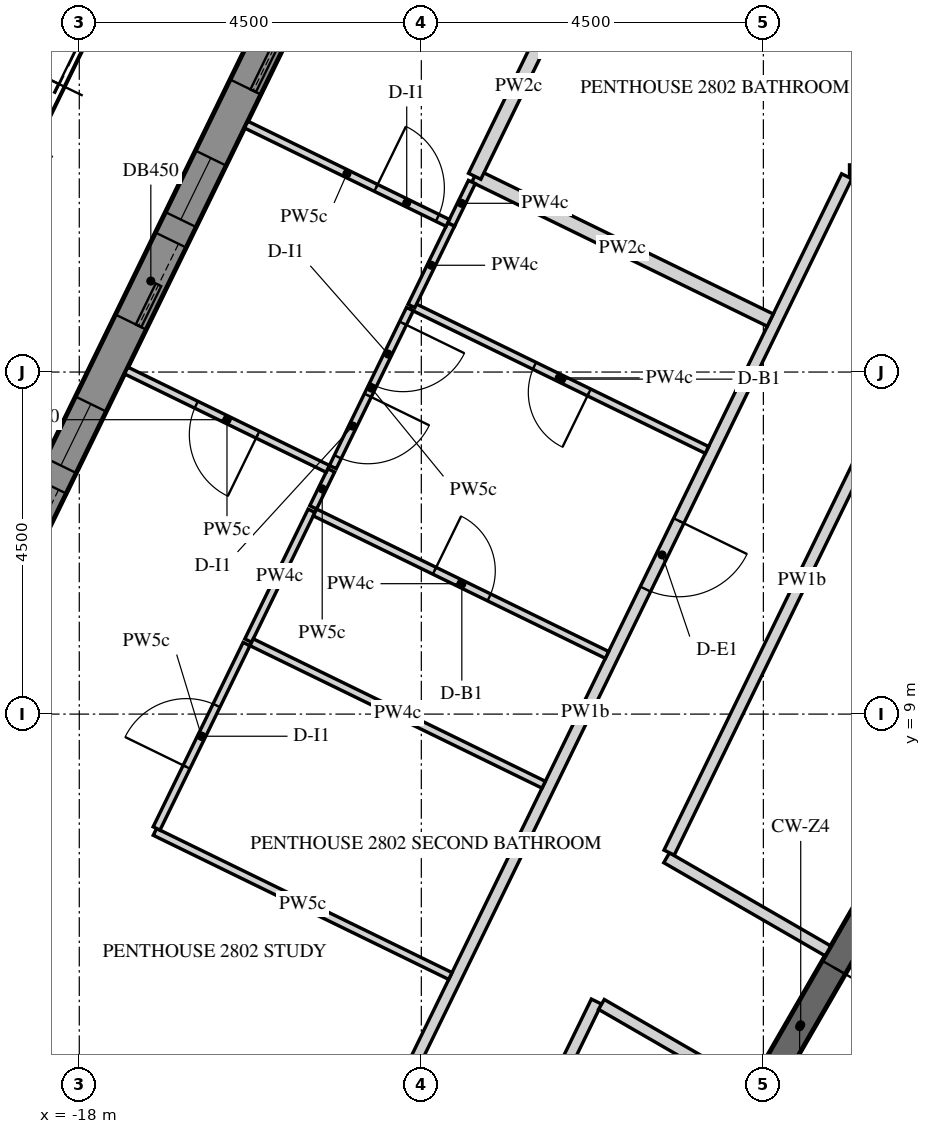
"""IFC4 building model, lengths in metres.
Left out: names, types, materials, properties, quantities, classifications, styles, units other than length and angle.
Written with IfcOpenShell. Run it as: python <this file> out.ifc"""

import sys

from ifc_helpers import new_model, si_unit, direction, frame, frame_2d, origin, place, context, subcontext, project, spatial, polyline, rectangle, outline, extrude, element, fill, save


model = new_model("IFC4")
c1 = context("Model", 3, precision=1e-05, world=origin(), true_north=direction((0.0, 1.0)))
c2 = subcontext(c1, "Body", "Model", "MODEL_VIEW")
j1 = project(units=[si_unit("LENGTHUNIT", "METRE"), si_unit("PLANEANGLEUNIT", "RADIAN")], contexts=[c1])
p1 = place(None, origin())
s1 = spatial("IfcSite", under=j1, at=p1, CompositionType="ELEMENT")
p2 = place(p1, origin())
s2 = spatial("IfcBuilding", under=s1, at=p2, CompositionType="ELEMENT")
p3 = place(p2, frame((0.0, 0.0, 361.2)))
s3 = spatial("IfcBuildingStorey", under=s2, at=p3, CompositionType="ELEMENT", Elevation=361.2)
p4 = place(p3, frame((-14.619, 19.699, -0.15), z_axis=(0.0, 0.0, 1.0), x_axis=(-0.438373747484, -0.898792777851, 0.0)))
e1 = element("IfcWall", 1, at=p4, inside=s3, PredefinedType="SOLIDWALL", context=c2, shape_type="SweptSolid", body=[
    extrude(outline(polyline([(0.225, -0.225), (20.506, -0.225), (20.957, 0.225), (-0.225, 0.225), (0.225, -0.225)])), origin(), (0.0, 0.0, 1.0), 3.9),
])
p5 = place(p4, frame((0.325, 0.0, 1.05)))
e2 = element("IfcOpeningElement", 2, at=p5, cuts=e1, PredefinedType="OPENING", context=c2, shape_type="SweptSolid", body=[
    extrude(rectangle(XDim=0.9, YDim=1.5, at=frame_2d((0.45, 0.75))), frame((0.0, 0.235, 0.0), z_axis=(0.0, -1.0, 0.0), x_axis=(1.0, 0.0, 0.0)), (0.0, 0.0, 1.0), 0.47),
])
p6 = place(p4, frame((1.525, 0.0, 0.15)))
e3 = element("IfcOpeningElement", 3, at=p6, cuts=e1, PredefinedType="OPENING", context=c2, shape_type="SweptSolid", body=[
    extrude(rectangle(XDim=1.2, YDim=2.4, at=frame_2d((0.6, 1.2))), frame((0.0, 0.235, 0.0), z_axis=(0.0, -1.0, 0.0), x_axis=(1.0, 0.0, 0.0)), (0.0, 0.0, 1.0), 0.47),
])
p7 = place(p4, frame((3.766, 0.0, 1.05)))
e4 = element("IfcOpeningElement", 4, at=p7, cuts=e1, PredefinedType="OPENING", context=c2, shape_type="SweptSolid", body=[
    extrude(rectangle(XDim=0.9, YDim=1.5, at=frame_2d((0.45, 0.75))), frame((0.0, 0.235, 0.0), z_axis=(0.0, -1.0, 0.0), x_axis=(1.0, 0.0, 0.0)), (0.0, 0.0, 1.0), 0.47),
])
p8 = place(p4, frame((4.966, 0.0, 0.15)))
e5 = element("IfcOpeningElement", 5, at=p8, cuts=e1, PredefinedType="OPENING", context=c2, shape_type="SweptSolid", body=[
    extrude(rectangle(XDim=1.2, YDim=2.4, at=frame_2d((0.6, 1.2))), frame((0.0, 0.235, 0.0), z_axis=(0.0, -1.0, 0.0), x_axis=(1.0, 0.0, 0.0)), (0.0, 0.0, 1.0), 0.47),
])
p9 = place(p4, frame((7.366, 0.0, 1.05)))
e6 = element("IfcOpeningElement", 6, at=p9, cuts=e1, PredefinedType="OPENING", context=c2, shape_type="SweptSolid", body=[
    extrude(rectangle(XDim=0.9, YDim=1.5, at=frame_2d((0.45, 0.75))), frame((0.0, 0.235, 0.0), z_axis=(0.0, -1.0, 0.0), x_axis=(1.0, 0.0, 0.0)), (0.0, 0.0, 1.0), 0.47),
])
p10 = place(p4, frame((8.566, 0.0, 0.15)))
e7 = element("IfcOpeningElement", 7, at=p10, cuts=e1, PredefinedType="OPENING", context=c2, shape_type="SweptSolid", body=[
    extrude(rectangle(XDim=1.2, YDim=2.4, at=frame_2d((0.6, 1.2))), frame((0.0, 0.235, 0.0), z_axis=(0.0, -1.0, 0.0), x_axis=(1.0, 0.0, 0.0)), (0.0, 0.0, 1.0), 0.47),
])
p11 = place(p4, frame((10.966, 0.0, 1.05)))
e8 = element("IfcOpeningElement", 8, at=p11, cuts=e1, PredefinedType="OPENING", context=c2, shape_type="SweptSolid", body=[
    extrude(rectangle(XDim=0.9, YDim=1.5, at=frame_2d((0.45, 0.75))), frame((0.0, 0.235, 0.0), z_axis=(0.0, -1.0, 0.0), x_axis=(1.0, 0.0, 0.0)), (0.0, 0.0, 1.0), 0.47),
])
p12 = place(p4, frame((12.166, 0.0, 0.15)))
e9 = element("IfcOpeningElement", 9, at=p12, cuts=e1, PredefinedType="OPENING", context=c2, shape_type="SweptSolid", body=[
    extrude(rectangle(XDim=1.2, YDim=2.4, at=frame_2d((0.6, 1.2))), frame((0.0, 0.235, 0.0), z_axis=(0.0, -1.0, 0.0), x_axis=(1.0, 0.0, 0.0)), (0.0, 0.0, 1.0), 0.47),
])
p13 = place(p4, frame((14.566, 0.0, 1.05)))
e10 = element("IfcOpeningElement", 10, at=p13, cuts=e1, PredefinedType="OPENING", context=c2, shape_type="SweptSolid", body=[
    extrude(rectangle(XDim=0.9, YDim=1.5, at=frame_2d((0.45, 0.75))), frame((0.0, 0.235, 0.0), z_axis=(0.0, -1.0, 0.0), x_axis=(1.0, 0.0, 0.0)), (0.0, 0.0, 1.0), 0.47),
])
p14 = place(p4, frame((15.766, 0.0, 0.15)))
e11 = element("IfcOpeningElement", 11, at=p14, cuts=e1, PredefinedType="OPENING", context=c2, shape_type="SweptSolid", body=[
    extrude(rectangle(XDim=1.2, YDim=2.4, at=frame_2d((0.6, 1.2))), frame((0.0, 0.235, 0.0), z_axis=(0.0, -1.0, 0.0), x_axis=(1.0, 0.0, 0.0)), (0.0, 0.0, 1.0), 0.47),
])
p15 = place(p4, frame((18.007, 0.0, 1.05)))
e12 = element("IfcOpeningElement", 12, at=p15, cuts=e1, PredefinedType="OPENING", context=c2, shape_type="SweptSolid", body=[
    extrude(rectangle(XDim=0.9, YDim=1.5, at=frame_2d((0.45, 0.75))), frame((0.0, 0.235, 0.0), z_axis=(0.0, -1.0, 0.0), x_axis=(1.0, 0.0, 0.0)), (0.0, 0.0, 1.0), 0.47),
])
p16 = place(p4, frame((19.207, 0.0, 0.15)))
e13 = element("IfcOpeningElement", 13, at=p16, cuts=e1, PredefinedType="OPENING", context=c2, shape_type="SweptSolid", body=[
    extrude(rectangle(XDim=1.2, YDim=2.4, at=frame_2d((0.6, 1.2))), frame((0.0, 0.235, 0.0), z_axis=(0.0, -1.0, 0.0), x_axis=(1.0, 0.0, 0.0)), (0.0, 0.0, 1.0), 0.47),
])
p17 = place(p3, frame((-5.673, 9.825, -0.15), z_axis=(0.0, 0.0, 1.0), x_axis=(-0.499995046907, -0.866028263435, 0.0)))
e14 = element("IfcWall", 14, at=p17, inside=s3, PredefinedType="SHEAR", context=c2, shape_type="SweptSolid", body=[
    extrude(outline(polyline([(-0.101, -0.175), (11.446, -0.175), (11.244, 0.175), (0.101, 0.175), (-0.101, -0.175)])), origin(), (0.0, 0.0, 1.0), 3.9),
])
p18 = place(p17, frame((4.801, 0.0, 0.15)))
e15 = element("IfcOpeningElement", 15, at=p18, cuts=e14, PredefinedType="OPENING", context=c2, shape_type="SweptSolid", body=[
    extrude(rectangle(XDim=1.8, YDim=2.4, at=frame_2d((0.9, 1.2))), frame((0.0, 0.185, 0.0), z_axis=(0.0, -1.0, 0.0), x_axis=(1.0, 0.0, 0.0)), (0.0, 0.0, 1.0), 0.37),
])
p19 = place(p3, frame((6.1, 16.15, 0.0), z_axis=(0.0, 0.0, 1.0), x_axis=(-1.0, 0.0, 0.0)))
e16 = element("IfcWall", 16, at=p19, inside=s3, PredefinedType="PARTITIONING", context=c2, shape_type="SweptSolid", body=[
    extrude(rectangle(XDim=13.966, YDim=0.15, at=frame_2d((6.983, 0.0))), origin(), (0.0, 0.0, 1.0), 2.82),
])
p20 = place(p19, frame((3.325, 0.0, 0.0)))
e17 = element("IfcOpeningElement", 17, at=p20, cuts=e16, PredefinedType="OPENING", context=c2, shape_type="SweptSolid", body=[
    extrude(rectangle(XDim=1.0, YDim=2.1, at=frame_2d((0.5, 1.05))), frame((0.0, 0.085, 0.0), z_axis=(0.0, -1.0, 0.0), x_axis=(1.0, 0.0, 0.0)), (0.0, 0.0, 1.0), 0.17),
])
p21 = place(p3, frame((-7.903, 16.075, 0.0), z_axis=(0.0, 0.0, 1.0), x_axis=(-0.438364761272, -0.898797160696, 0.0)))
e18 = element("IfcWall", 18, at=p21, inside=s3, PredefinedType="PARTITIONING", context=c2, shape_type="SweptSolid", body=[
    extrude(rectangle(XDim=15.688, YDim=0.15, at=frame_2d((7.844, 0.0))), origin(), (0.0, 0.0, 1.0), 2.82),
])
p22 = place(p21, frame((5.042, 0.0, 0.0)))
e19 = element("IfcOpeningElement", 19, at=p22, cuts=e18, PredefinedType="OPENING", context=c2, shape_type="SweptSolid", body=[
    extrude(rectangle(XDim=1.0, YDim=2.1, at=frame_2d((0.5, 1.05))), frame((0.0, 0.085, 0.0), z_axis=(0.0, -1.0, 0.0), x_axis=(1.0, 0.0, 0.0)), (0.0, 0.0, 1.0), 0.17),
])
p23 = place(p3, frame((-13.466, 0.564, 0.0), z_axis=(0.0, 0.0, 1.0), x_axis=(0.438366040624, 0.898796536724, 0.0)))
e20 = element("IfcWall", 20, at=p23, inside=s3, PredefinedType="PARTITIONING", context=c2, shape_type="SweptSolid", body=[
    extrude(rectangle(XDim=5.178, YDim=0.15, at=frame_2d((2.589, 0.0))), origin(), (0.0, 0.0, 1.0), 2.82),
])
p24 = place(p3, frame((-11.131, 5.18, 0.0), z_axis=(0.0, 0.0, 1.0), x_axis=(0.866037886895, -0.499978377995, 0.0)))
e21 = element("IfcWall", 21, at=p24, inside=s3, PredefinedType="PARTITIONING", context=c2, shape_type="SweptSolid", body=[
    extrude(rectangle(XDim=2.229, YDim=0.15, at=frame_2d((1.115, 0.0))), origin(), (0.0, 0.0, 1.0), 2.82),
])
p25 = place(p3, frame((-8.15, 5.884, 0.0), z_axis=(0.0, 0.0, 1.0), x_axis=(-0.866009790468, 0.500027042082, 0.0)))
e22 = element("IfcWall", 22, at=p25, inside=s3, PredefinedType="PARTITIONING", context=c2, shape_type="SweptSolid", body=[
    extrude(rectangle(XDim=2.451, YDim=0.15, at=frame_2d((1.226, 0.0))), origin(), (0.0, 0.0, 1.0), 2.82),
])
p26 = place(p3, frame((-10.24, 7.178, 0.0), z_axis=(0.0, 0.0, 1.0), x_axis=(0.438356120288, 0.898801375058, 0.0)))
e23 = element("IfcWall", 23, at=p26, inside=s3, PredefinedType="PARTITIONING", context=c2, shape_type="SweptSolid", body=[
    extrude(rectangle(XDim=7.98, YDim=0.15, at=frame_2d((3.99, 0.0))), origin(), (0.0, 0.0, 1.0), 2.82),
])
p27 = place(p3, frame((-12.797, 16.079, 0.0), z_axis=(0.0, 0.0, 1.0), x_axis=(0.898786890582, -0.438385817879, 0.0)))
e24 = element("IfcWall", 24, at=p27, inside=s3, PredefinedType="PARTITIONING", context=c2, shape_type="SweptSolid", body=[
    extrude(rectangle(XDim=4.325, YDim=0.18, at=frame_2d((2.163, 0.0))), origin(), (0.0, 0.0, 1.0), 2.82),
])
p28 = place(p3, frame((-11.638, 18.455, 0.0), z_axis=(0.0, 0.0, 1.0), x_axis=(-0.438336396292, -0.898810994417, 0.0)))
e25 = element("IfcWall", 25, at=p28, inside=s3, PredefinedType="PARTITIONING", context=c2, shape_type="SweptSolid", body=[
    extrude(rectangle(XDim=2.647, YDim=0.18, at=frame_2d((1.323, 0.0))), origin(), (0.0, 0.0, 1.0), 2.82),
])
p29 = place(p3, frame((-14.923, 11.72, 0.0), z_axis=(0.0, 0.0, 1.0), x_axis=(0.438174929392, 0.898889721408, 0.0)))
e26 = element("IfcWall", 26, at=p29, inside=s3, PredefinedType="PARTITIONING", context=c2, shape_type="SweptSolid", body=[
    extrude(rectangle(XDim=0.542, YDim=0.1, at=frame_2d((0.271, 0.0))), origin(), (0.0, 0.0, 1.0), 2.82),
])
p30 = place(p3, frame((-14.731, 12.227, 0.0), z_axis=(0.0, 0.0, 1.0), x_axis=(-0.898802642499, 0.438353521528, 0.0)))
e27 = element("IfcWall", 27, at=p30, inside=s3, PredefinedType="PARTITIONING", context=c2, shape_type="SweptSolid", body=[
    extrude(rectangle(XDim=2.95, YDim=0.1, at=frame_2d((1.475, 0.0))), origin(), (0.0, 0.0, 1.0), 2.82),
])
p31 = place(p30, frame((1.025, 0.0, 0.0)))
e28 = element("IfcOpeningElement", 28, at=p31, cuts=e27, PredefinedType="OPENING", context=c2, shape_type="SweptSolid", body=[
    extrude(rectangle(XDim=0.9, YDim=2.1, at=frame_2d((0.45, 1.05))), frame((0.0, 0.06, 0.0), z_axis=(0.0, -1.0, 0.0), x_axis=(1.0, 0.0, 0.0)), (0.0, 0.0, 1.0), 0.12),
])
p32 = place(p3, frame((-15.778, 9.967, 0.0), z_axis=(0.0, 0.0, 1.0), x_axis=(0.43840337997, 0.898778324411, 0.0)))
e29 = element("IfcWall", 29, at=p32, inside=s3, PredefinedType="PARTITIONING", context=c2, shape_type="SweptSolid", body=[
    extrude(rectangle(XDim=1.9, YDim=0.1, at=frame_2d((0.95, 0.0))), origin(), (0.0, 0.0, 1.0), 2.82),
])
p33 = place(p3, frame((-13.118, 5.554, 0.0), z_axis=(0.0, 0.0, 1.0), x_axis=(-0.898786890582, 0.438385817879, 0.0)))
e30 = element("IfcWall", 30, at=p33, inside=s3, PredefinedType="PARTITIONING", context=c2, shape_type="SweptSolid", body=[
    extrude(rectangle(XDim=4.325, YDim=0.1, at=frame_2d((2.163, 0.0))), origin(), (0.0, 0.0, 1.0), 2.82),
])
p34 = place(p3, frame((-16.983, 7.495, 0.0), z_axis=(0.0, 0.0, 1.0), x_axis=(0.438366623032, 0.898796252669, 0.0)))
e31 = element("IfcWall", 31, at=p34, inside=s3, PredefinedType="PARTITIONING", context=c2, shape_type="SweptSolid", body=[
    extrude(rectangle(XDim=2.7, YDim=0.1, at=frame_2d((1.35, 0.0))), origin(), (0.0, 0.0, 1.0), 2.82),
])
p35 = place(p34, frame((0.9, 0.0, 0.0)))
e32 = element("IfcOpeningElement", 32, at=p35, cuts=e31, PredefinedType="OPENING", context=c2, shape_type="SweptSolid", body=[
    extrude(rectangle(XDim=0.9, YDim=2.1, at=frame_2d((0.45, 1.05))), frame((0.0, 0.06, 0.0), z_axis=(0.0, -1.0, 0.0), x_axis=(1.0, 0.0, 0.0)), (0.0, 0.0, 1.0), 0.12),
])
p36 = place(p3, frame((-9.742, 12.475, 0.0), z_axis=(0.0, 0.0, 1.0), x_axis=(-0.898786890582, 0.438385817879, 0.0)))
e33 = element("IfcWall", 33, at=p36, inside=s3, PredefinedType="PARTITIONING", context=c2, shape_type="SweptSolid", body=[
    extrude(rectangle(XDim=4.325, YDim=0.1, at=frame_2d((2.163, 0.0))), origin(), (0.0, 0.0, 1.0), 2.82),
])
p37 = place(p36, frame((1.725, 0.0, 0.0)))
e34 = element("IfcOpeningElement", 34, at=p37, cuts=e33, PredefinedType="OPENING", context=c2, shape_type="SweptSolid", body=[
    extrude(rectangle(XDim=0.8, YDim=2.1, at=frame_2d((0.4, 1.05))), frame((0.0, 0.06, 0.0), z_axis=(0.0, -1.0, 0.0), x_axis=(1.0, 0.0, 0.0)), (0.0, 0.0, 1.0), 0.12),
])
p38 = place(p3, frame((-13.651, 14.328, 0.0), z_axis=(0.0, 0.0, 1.0), x_axis=(-0.438406989319, -0.898776563845, 0.0)))
e35 = element("IfcWall", 35, at=p38, inside=s3, PredefinedType="PARTITIONING", context=c2, shape_type="SweptSolid", body=[
    extrude(rectangle(XDim=2.312, YDim=0.1, at=frame_2d((1.156, 0.0))), origin(), (0.0, 0.0, 1.0), 2.82),
])
p39 = place(p38, frame((1.262, 0.0, 0.0)))
e36 = element("IfcOpeningElement", 36, at=p39, cuts=e35, PredefinedType="OPENING", context=c2, shape_type="SweptSolid", body=[
    extrude(rectangle(XDim=0.9, YDim=2.1, at=frame_2d((0.45, 1.05))), frame((0.0, 0.06, 0.0), z_axis=(0.0, -1.0, 0.0), x_axis=(1.0, 0.0, 0.0)), (0.0, 0.0, 1.0), 0.12),
])
p40 = place(p38, frame((0.207, 0.0, 0.0)))
e37 = element("IfcOpeningElement", 37, at=p40, cuts=e35, PredefinedType="OPENING", context=c2, shape_type="SweptSolid", body=[
    extrude(rectangle(XDim=0.9, YDim=2.1, at=frame_2d((0.45, 1.05))), frame((0.0, 0.06, 0.0), z_axis=(0.0, -1.0, 0.0), x_axis=(1.0, 0.0, 0.0)), (0.0, 0.0, 1.0), 0.12),
])
p41 = place(p3, frame((-14.9, 11.653, 0.0), z_axis=(0.0, 0.0, 1.0), x_axis=(0.898792594469, -0.438374123469, 0.0)))
e38 = element("IfcWall", 38, at=p41, inside=s3, PredefinedType="PARTITIONING", context=c2, shape_type="SweptSolid", body=[
    extrude(rectangle(XDim=4.275, YDim=0.1, at=frame_2d((2.137, 0.0))), origin(), (0.0, 0.0, 1.0), 2.82),
])
p42 = place(p41, frame((1.75, 0.0, 0.0)))
e39 = element("IfcOpeningElement", 39, at=p42, cuts=e38, PredefinedType="OPENING", context=c2, shape_type="SweptSolid", body=[
    extrude(rectangle(XDim=0.8, YDim=2.1, at=frame_2d((0.4, 1.05))), frame((0.0, 0.06, 0.0), z_axis=(0.0, -1.0, 0.0), x_axis=(1.0, 0.0, 0.0)), (0.0, 0.0, 1.0), 0.12),
])
p43 = place(p3, frame((-12.835, 16.0, 0.0), z_axis=(0.0, 0.0, 1.0), x_axis=(-0.43824583471, -0.898855154271, 0.0)))
e40 = element("IfcWall", 40, at=p43, inside=s3, PredefinedType="PARTITIONING", context=c2, shape_type="SweptSolid", body=[
    extrude(rectangle(XDim=0.622, YDim=0.1, at=frame_2d((0.311, 0.0))), origin(), (0.0, 0.0, 1.0), 2.82),
])
p44 = place(p3, frame((-13.108, 15.44, 0.0), z_axis=(0.0, 0.0, 1.0), x_axis=(-0.438423632021, -0.898768445644, 0.0)))
e41 = element("IfcWall", 41, at=p44, inside=s3, PredefinedType="PARTITIONING", context=c2, shape_type="SweptSolid", body=[
    extrude(rectangle(XDim=1.192, YDim=0.1, at=frame_2d((0.596, 0.0))), origin(), (0.0, 0.0, 1.0), 2.82),
])
p45 = place(p3, frame((-15.804, 16.756, 0.0), z_axis=(0.0, 0.0, 1.0), x_axis=(0.898802642499, -0.438353521528, 0.0)))
e42 = element("IfcWall", 42, at=p45, inside=s3, PredefinedType="PARTITIONING", context=c2, shape_type="SweptSolid", body=[
    extrude(rectangle(XDim=2.95, YDim=0.1, at=frame_2d((1.475, 0.0))), origin(), (0.0, 0.0, 1.0), 2.82),
])
p46 = place(p45, frame((1.9, 0.0, 0.0)))
e43 = element("IfcOpeningElement", 43, at=p46, cuts=e42, PredefinedType="OPENING", context=c2, shape_type="SweptSolid", body=[
    extrude(rectangle(XDim=0.9, YDim=2.1, at=frame_2d((0.45, 1.05))), frame((0.0, 0.06, 0.0), z_axis=(0.0, -1.0, 0.0), x_axis=(1.0, 0.0, 0.0)), (0.0, 0.0, 1.0), 0.12),
])
p47 = place(p3, frame((-15.733, 9.945, 0.0), z_axis=(0.0, 0.0, 1.0), x_axis=(0.898803568504, -0.438351622837, 0.0)))
e44 = element("IfcWall", 44, at=p47, inside=s3, PredefinedType="PARTITIONING", context=c2, shape_type="SweptSolid", body=[
    extrude(rectangle(XDim=4.275, YDim=0.1, at=frame_2d((2.138, 0.0))), origin(), (0.0, 0.0, 1.0), 2.82),
])
p48 = place(p6, frame((0.0, 0.15, 0.0)))
e45 = element("IfcDoor", 45, at=p48, inside=s3, OperationType="SLIDING_TO_LEFT", PredefinedType="DOOR", context=c2, shape_type="SweptSolid", body=[
    extrude(rectangle(XDim=1.2, YDim=2.4, at=frame_2d((0.6, 1.2))), frame((0.0, 0.025, 0.0), z_axis=(0.0, -1.0, 0.0), x_axis=(1.0, 0.0, 0.0)), (0.0, 0.0, 1.0), 0.05),
])
fill(e3, e45)
p49 = place(p7, frame((0.0, 0.155, 0.0)))
e46 = element("IfcWindow", 46, at=p49, inside=s3, PartitioningType="SINGLE_PANEL", PredefinedType="WINDOW", context=c2, shape_type="SweptSolid", body=[
    extrude(rectangle(XDim=0.9, YDim=1.5, at=frame_2d((0.45, 0.75))), frame((0.0, 0.03, 0.0), z_axis=(0.0, -1.0, 0.0), x_axis=(1.0, 0.0, 0.0)), (0.0, 0.0, 1.0), 0.06),
])
fill(e4, e46)
p50 = place(p8, frame((0.0, 0.15, 0.0)))
e47 = element("IfcDoor", 47, at=p50, inside=s3, OperationType="SLIDING_TO_LEFT", PredefinedType="DOOR", context=c2, shape_type="SweptSolid", body=[
    extrude(rectangle(XDim=1.2, YDim=2.4, at=frame_2d((0.6, 1.2))), frame((0.0, 0.025, 0.0), z_axis=(0.0, -1.0, 0.0), x_axis=(1.0, 0.0, 0.0)), (0.0, 0.0, 1.0), 0.05),
])
fill(e5, e47)
p51 = place(p9, frame((0.0, 0.155, 0.0)))
e48 = element("IfcWindow", 48, at=p51, inside=s3, PartitioningType="SINGLE_PANEL", PredefinedType="WINDOW", context=c2, shape_type="SweptSolid", body=[
    extrude(rectangle(XDim=0.9, YDim=1.5, at=frame_2d((0.45, 0.75))), frame((0.0, 0.03, 0.0), z_axis=(0.0, -1.0, 0.0), x_axis=(1.0, 0.0, 0.0)), (0.0, 0.0, 1.0), 0.06),
])
fill(e6, e48)
p52 = place(p10, frame((0.0, 0.15, 0.0)))
e49 = element("IfcDoor", 49, at=p52, inside=s3, OperationType="SLIDING_TO_LEFT", PredefinedType="DOOR", context=c2, shape_type="SweptSolid", body=[
    extrude(rectangle(XDim=1.2, YDim=2.4, at=frame_2d((0.6, 1.2))), frame((0.0, 0.025, 0.0), z_axis=(0.0, -1.0, 0.0), x_axis=(1.0, 0.0, 0.0)), (0.0, 0.0, 1.0), 0.05),
])
fill(e7, e49)
p53 = place(p18, origin())
e50 = element("IfcDoor", 50, at=p53, inside=s3, OperationType="DOUBLE_DOOR_SINGLE_SWING", PredefinedType="DOOR", context=c2, shape_type="SweptSolid", body=[
    extrude(rectangle(XDim=1.8, YDim=2.4, at=frame_2d((0.9, 1.2))), frame((0.0, 0.025, 0.0), z_axis=(0.0, -1.0, 0.0), x_axis=(1.0, 0.0, 0.0)), (0.0, 0.0, 1.0), 0.05),
])
fill(e15, e50)
p54 = place(p22, origin())
e51 = element("IfcDoor", 51, at=p54, inside=s3, OperationType="SINGLE_SWING_LEFT", PredefinedType="DOOR", context=c2, shape_type="SweptSolid", body=[
    extrude(rectangle(XDim=1.0, YDim=2.1, at=frame_2d((0.5, 1.05))), frame((0.0, 0.025, 0.0), z_axis=(0.0, -1.0, 0.0), x_axis=(1.0, 0.0, 0.0)), (0.0, 0.0, 1.0), 0.05),
])
fill(e19, e51)
p55 = place(p37, origin())
e52 = element("IfcDoor", 52, at=p55, inside=s3, OperationType="SINGLE_SWING_RIGHT", PredefinedType="DOOR", context=c2, shape_type="SweptSolid", body=[
    extrude(rectangle(XDim=0.8, YDim=2.1, at=frame_2d((0.4, 1.05))), frame((0.0, 0.025, 0.0), z_axis=(0.0, -1.0, 0.0), x_axis=(1.0, 0.0, 0.0)), (0.0, 0.0, 1.0), 0.05),
])
fill(e34, e52)
p56 = place(p39, origin())
e53 = element("IfcDoor", 53, at=p56, inside=s3, OperationType="SINGLE_SWING_RIGHT", PredefinedType="DOOR", context=c2, shape_type="SweptSolid", body=[
    extrude(rectangle(XDim=0.9, YDim=2.1, at=frame_2d((0.45, 1.05))), frame((0.0, 0.025, 0.0), z_axis=(0.0, -1.0, 0.0), x_axis=(1.0, 0.0, 0.0)), (0.0, 0.0, 1.0), 0.05),
])
fill(e36, e53)
p57 = place(p46, origin())
e54 = element("IfcDoor", 54, at=p57, inside=s3, OperationType="SINGLE_SWING_RIGHT", PredefinedType="DOOR", context=c2, shape_type="SweptSolid", body=[
    extrude(rectangle(XDim=0.9, YDim=2.1, at=frame_2d((0.45, 1.05))), frame((0.0, 0.025, 0.0), z_axis=(0.0, -1.0, 0.0), x_axis=(1.0, 0.0, 0.0)), (0.0, 0.0, 1.0), 0.05),
])
fill(e43, e54)
p58 = place(p40, origin())
e55 = element("IfcDoor", 55, at=p58, inside=s3, OperationType="SINGLE_SWING_RIGHT", PredefinedType="DOOR", context=c2, shape_type="SweptSolid", body=[
    extrude(rectangle(XDim=0.9, YDim=2.1, at=frame_2d((0.45, 1.05))), frame((0.0, 0.025, 0.0), z_axis=(0.0, -1.0, 0.0), x_axis=(1.0, 0.0, 0.0)), (0.0, 0.0, 1.0), 0.05),
])
fill(e37, e55)
p59 = place(p42, origin())
e56 = element("IfcDoor", 56, at=p59, inside=s3, OperationType="SINGLE_SWING_RIGHT", PredefinedType="DOOR", context=c2, shape_type="SweptSolid", body=[
    extrude(rectangle(XDim=0.8, YDim=2.1, at=frame_2d((0.4, 1.05))), frame((0.0, 0.025, 0.0), z_axis=(0.0, -1.0, 0.0), x_axis=(1.0, 0.0, 0.0)), (0.0, 0.0, 1.0), 0.05),
])
fill(e39, e56)
p60 = place(p35, origin())
e57 = element("IfcDoor", 57, at=p60, inside=s3, OperationType="SINGLE_SWING_RIGHT", PredefinedType="DOOR", context=c2, shape_type="SweptSolid", body=[
    extrude(rectangle(XDim=0.9, YDim=2.1, at=frame_2d((0.45, 1.05))), frame((0.0, 0.025, 0.0), z_axis=(0.0, -1.0, 0.0), x_axis=(1.0, 0.0, 0.0)), (0.0, 0.0, 1.0), 0.05),
])
fill(e32, e57)
p61 = place(p31, origin())
e58 = element("IfcDoor", 58, at=p61, inside=s3, OperationType="SINGLE_SWING_LEFT", PredefinedType="DOOR", context=c2, shape_type="SweptSolid", body=[
    extrude(rectangle(XDim=0.9, YDim=2.1, at=frame_2d((0.45, 1.05))), frame((0.0, 0.025, 0.0), z_axis=(0.0, -1.0, 0.0), x_axis=(1.0, 0.0, 0.0)), (0.0, 0.0, 1.0), 0.05),
])
fill(e28, e58)
save(model, sys.argv[1])
